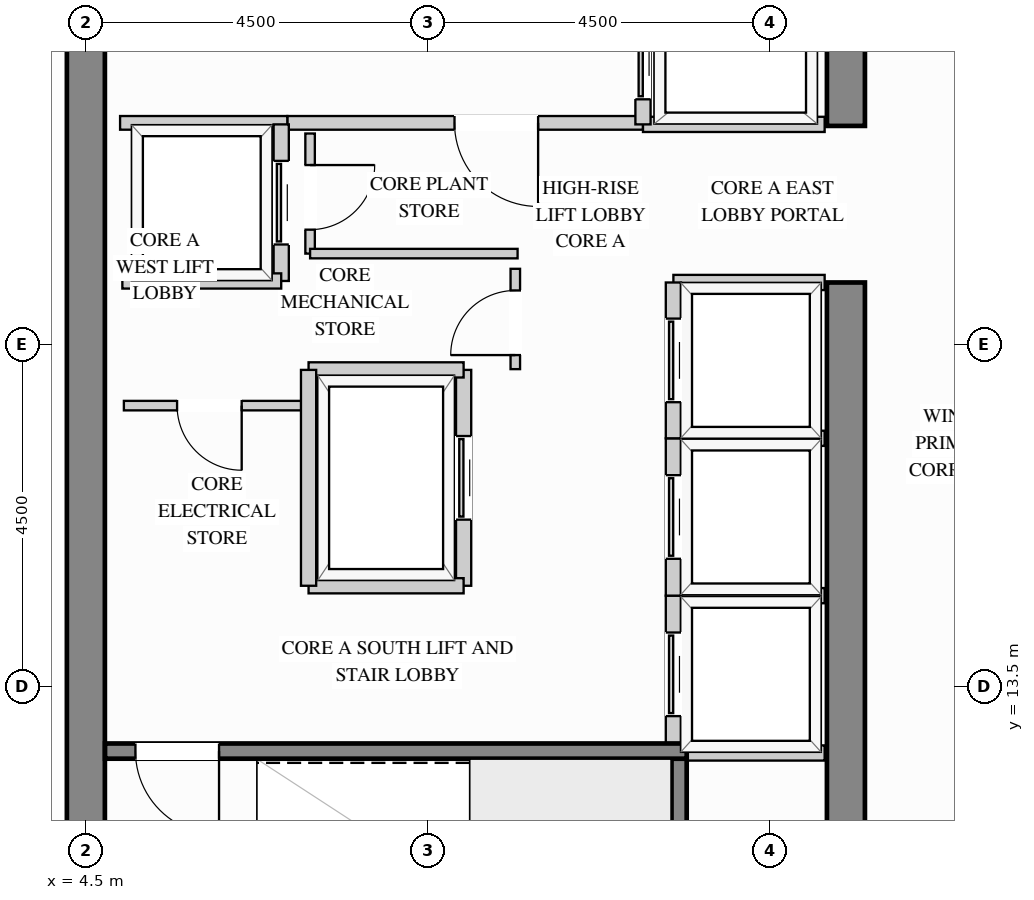
"""IFC4 building model, lengths in metres.
Left out: names, types, materials, properties, quantities, classifications, styles, units other than length and angle.
Written with IfcOpenShell. Run it as: python <this file> out.ifc"""

import sys

from ifc_helpers import new_model, si_unit, direction, frame, frame_2d, origin, place, context, subcontext, project, spatial, rectangle, extrude, source, transform, mapped, element, fill, save


model = new_model("IFC4")
c1 = context("Model", 3, precision=1e-05, world=origin(), true_north=direction((0.0, 1.0)))
c2 = subcontext(c1, "Body", "Model", "MODEL_VIEW")
j1 = project(units=[si_unit("LENGTHUNIT", "METRE"), si_unit("PLANEANGLEUNIT", "RADIAN")], contexts=[c1])
p1 = place(None, origin())
s1 = spatial("IfcSite", under=j1, at=p1, CompositionType="ELEMENT")
p2 = place(p1, origin())
s2 = spatial("IfcBuilding", under=s1, at=p2, CompositionType="ELEMENT")
p3 = place(p2, frame((0.0, 0.0, 230.4)))
s3 = spatial("IfcBuildingStorey", under=s2, at=p3, CompositionType="ELEMENT", Elevation=230.4)
m1 = source(origin(), c2, "Body", "SweptSolid", [
    extrude(rectangle(XDim=10.07, YDim=0.5, at=frame_2d((5.035, 0.0))), origin(), (0.0, 0.0, 1.0), 3.4),
])
p4 = place(p3, frame((14.5, 8.75, 0.0), z_axis=(0.0, 0.0, 1.0), x_axis=(0.0, 1.0, 0.0)))
e1 = element("IfcWall", 1, at=p4, inside=s3, PredefinedType="SHEAR", context=c2, shape_type="MappedRepresentation", body=[
    mapped(m1, transform((0.0, 0.0, 0.0), x_axis=(1.0, 0.0, 0.0), y_axis=(0.0, 1.0, 0.0), z_axis=(0.0, 0.0, 1.0))),
])
m2 = source(origin(), c2, "Body", "SweptSolid", [
    extrude(rectangle(XDim=8.37, YDim=0.5, at=frame_2d((4.185, 0.0))), origin(), (0.0, 0.0, 1.0), 3.4),
])
p5 = place(p3, frame((14.5, 20.88, 0.0), z_axis=(0.0, 0.0, 1.0), x_axis=(0.0, 1.0, 0.0)))
e2 = element("IfcWall", 2, at=p5, inside=s3, PredefinedType="SHEAR", context=c2, shape_type="MappedRepresentation", body=[
    mapped(m2, transform((0.0, 0.0, 0.0), x_axis=(1.0, 0.0, 0.0), y_axis=(0.0, 1.0, 0.0), z_axis=(0.0, 0.0, 1.0))),
])
m3 = source(origin(), c2, "Body", "SweptSolid", [
    extrude(rectangle(XDim=20.5, YDim=0.5, at=frame_2d((10.25, 0.0))), origin(), (0.0, 0.0, 1.0), 3.4),
])
p6 = place(p3, frame((4.5, 8.75, 0.0), z_axis=(0.0, 0.0, 1.0), x_axis=(0.0, 1.0, 0.0)))
e3 = element("IfcWall", 3, at=p6, inside=s3, PredefinedType="SHEAR", context=c2, shape_type="MappedRepresentation", body=[
    mapped(m3, transform((0.0, 0.0, 0.0), x_axis=(1.0, 0.0, 0.0), y_axis=(0.0, 1.0, 0.0), z_axis=(0.0, 0.0, 1.0))),
])
p7 = place(p3, frame((7.15, 20.92, 0.0), z_axis=(0.0, 0.0, 1.0), x_axis=(1.0, 0.0, 0.0)))
e4 = element("IfcWall", 4, at=p7, inside=s3, PredefinedType="PARTITIONING", context=c2, shape_type="SweptSolid", body=[
    extrude(rectangle(XDim=4.68, YDim=0.18, at=frame_2d((2.34, 0.0))), origin(), (0.0, 0.0, 1.0), 3.385),
])
p8 = place(p7, frame((2.2, 0.0, 0.0)))
e5 = element("IfcOpeningElement", 5, at=p8, cuts=e4, PredefinedType="OPENING", context=c2, shape_type="SweptSolid", body=[
    extrude(rectangle(XDim=1.1, YDim=2.15, at=frame_2d((0.55, 1.075))), frame((0.0, 0.1, 0.0), z_axis=(0.0, -1.0, 0.0), x_axis=(1.0, 0.0, 0.0)), (0.0, 0.0, 1.0), 0.2),
])
m4 = source(origin(), c2, "Body", "SweptSolid", [
    extrude(rectangle(XDim=2.2, YDim=0.18, at=frame_2d((1.1, 0.0))), origin(), (0.0, 0.0, 1.0), 3.385),
])
p9 = place(p3, frame((4.95, 20.92, 0.0), z_axis=(0.0, 0.0, 1.0), x_axis=(1.0, 0.0, 0.0)))
e6 = element("IfcWall", 6, at=p9, inside=s3, PredefinedType="PARTITIONING", context=c2, shape_type="MappedRepresentation", body=[
    mapped(m4, transform((0.0, 0.0, 0.0), x_axis=(1.0, 0.0, 0.0), y_axis=(0.0, 1.0, 0.0), z_axis=(0.0, 0.0, 1.0))),
])
p10 = place(p3, frame((10.15, 17.68, 0.0), z_axis=(0.0, 0.0, 1.0), x_axis=(0.0, 1.0, 0.0)))
e7 = element("IfcWall", 7, at=p10, inside=s3, PredefinedType="PARTITIONING", context=c2, shape_type="SweptSolid", body=[
    extrude(rectangle(XDim=1.32, YDim=0.125, at=frame_2d((0.66, 0.0))), origin(), (0.0, 0.0, 1.0), 3.385),
])
p11 = place(p10, frame((0.185, 0.0, 0.0)))
e8 = element("IfcOpeningElement", 8, at=p11, cuts=e7, PredefinedType="OPENING", context=c2, shape_type="SweptSolid", body=[
    extrude(rectangle(XDim=0.85, YDim=2.1, at=frame_2d((0.425, 1.05))), frame((0.0, 0.073, 0.0), z_axis=(0.0, -1.0, 0.0), x_axis=(1.0, 0.0, 0.0)), (0.0, 0.0, 1.0), 0.145),
])
p12 = place(p3, frame((7.45, 19.2, 0.0), z_axis=(0.0, 0.0, 1.0), x_axis=(0.0, 1.0, 0.0)))
e9 = element("IfcWall", 9, at=p12, inside=s3, PredefinedType="PARTITIONING", context=c2, shape_type="SweptSolid", body=[
    extrude(rectangle(XDim=1.58, YDim=0.125, at=frame_2d((0.79, 0.0))), origin(), (0.0, 0.0, 1.0), 3.385),
])
p13 = place(p12, frame((0.315, 0.0, 0.0)))
e10 = element("IfcOpeningElement", 10, at=p13, cuts=e9, PredefinedType="OPENING", context=c2, shape_type="SweptSolid", body=[
    extrude(rectangle(XDim=0.85, YDim=2.1, at=frame_2d((0.425, 1.05))), frame((0.0, 0.073, 0.0), z_axis=(0.0, -1.0, 0.0), x_axis=(1.0, 0.0, 0.0)), (0.0, 0.0, 1.0), 0.145),
])
m5 = source(origin(), c2, "Body", "SweptSolid", [
    extrude(rectangle(XDim=2.73, YDim=0.125, at=frame_2d((1.365, 0.0))), origin(), (0.0, 0.0, 1.0), 3.385),
])
p14 = place(p3, frame((7.45, 19.2, 0.0), z_axis=(0.0, 0.0, 1.0), x_axis=(1.0, 0.0, 0.0)))
e11 = element("IfcWall", 11, at=p14, inside=s3, PredefinedType="PARTITIONING", context=c2, shape_type="MappedRepresentation", body=[
    mapped(m5, transform((0.0, 0.0, 0.0), x_axis=(1.0, 0.0, 0.0), y_axis=(0.0, 1.0, 0.0), z_axis=(0.0, 0.0, 1.0))),
])
p15 = place(p3, frame((5.0, 17.2, 0.0), z_axis=(0.0, 0.0, 1.0), x_axis=(1.0, 0.0, 0.0)))
e12 = element("IfcWall", 12, at=p15, inside=s3, PredefinedType="PARTITIONING", context=c2, shape_type="SweptSolid", body=[
    extrude(rectangle(XDim=2.4, YDim=0.125, at=frame_2d((1.2, 0.0))), origin(), (0.0, 0.0, 1.0), 3.385),
])
p16 = place(p15, frame((0.7, 0.0, 0.0)))
e13 = element("IfcOpeningElement", 13, at=p16, cuts=e12, PredefinedType="OPENING", context=c2, shape_type="SweptSolid", body=[
    extrude(rectangle(XDim=0.85, YDim=2.1, at=frame_2d((0.425, 1.05))), frame((0.0, 0.073, 0.0), z_axis=(0.0, -1.0, 0.0), x_axis=(1.0, 0.0, 0.0)), (0.0, 0.0, 1.0), 0.145),
])
m6 = source(origin(), c2, "Body", "SweptSolid", [
    extrude(rectangle(XDim=2.39, YDim=0.2, at=frame_2d((1.195, 0.0))), origin(), (0.0, 0.0, 1.0), 3.385),
])
p17 = place(p3, frame((11.83, 20.9, 0.0), z_axis=(0.0, 0.0, 1.0), x_axis=(1.0, 0.0, 0.0)))
e14 = element("IfcWall", 14, at=p17, inside=s3, PredefinedType="PARTITIONING", context=c2, shape_type="MappedRepresentation", body=[
    mapped(m6, transform((0.0, 0.0, 0.0), x_axis=(1.0, 0.0, 0.0), y_axis=(0.0, 1.0, 0.0), z_axis=(0.0, 0.0, 1.0))),
])
p18 = place(p3, frame((11.83, 20.9, 0.0), z_axis=(0.0, 0.0, 1.0), x_axis=(0.0, 1.0, 0.0)))
e15 = element("IfcWall", 15, at=p18, inside=s3, PredefinedType="PARTITIONING", context=c2, shape_type="SweptSolid", body=[
    extrude(rectangle(XDim=1.76, YDim=0.2, at=frame_2d((0.88, 0.0))), origin(), (0.0, 0.0, 1.0), 3.385),
])
p19 = place(p18, frame((0.33, 0.0, 0.0)))
e16 = element("IfcOpeningElement", 16, at=p19, cuts=e15, PredefinedType="OPENING", context=c2, shape_type="SweptSolid", body=[
    extrude(rectangle(XDim=1.1, YDim=2.2, at=frame_2d((0.55, 1.1))), frame((0.0, 0.11, 0.0), z_axis=(0.0, -1.0, 0.0), x_axis=(1.0, 0.0, 0.0)), (0.0, 0.0, 1.0), 0.22),
])
m7 = source(origin(), c2, "Body", "SweptSolid", [
    extrude(rectangle(XDim=1.99, YDim=0.2, at=frame_2d((0.995, 0.0))), origin(), (0.0, 0.0, 1.0), 3.385),
])
for number, where, z_axis, x_axis in (
    (17, (12.23, 14.7, 0.0), (0.0, 0.0, 1.0), (1.0, 0.0, 0.0)),
    (18, (12.23, 12.63, 0.0), (0.0, 0.0, 1.0), (1.0, 0.0, 0.0)),
):
    element("IfcWall", number, at=place(p3, frame(where, z_axis=z_axis, x_axis=x_axis)), inside=s3, PredefinedType="PARTITIONING", context=c2, shape_type="MappedRepresentation", body=[
        mapped(m7, transform((0.0, 0.0, 0.0), x_axis=(1.0, 0.0, 0.0), y_axis=(0.0, 1.0, 0.0), z_axis=(0.0, 0.0, 1.0))),
    ])
p20 = place(p3, frame((12.23, 12.63, 0.0), z_axis=(0.0, 0.0, 1.0), x_axis=(0.0, 1.0, 0.0)))
e19 = element("IfcWall", 19, at=p20, inside=s3, PredefinedType="PARTITIONING", context=c2, shape_type="SweptSolid", body=[
    extrude(rectangle(XDim=2.07, YDim=0.2, at=frame_2d((1.035, 0.0))), origin(), (0.0, 0.0, 1.0), 3.385),
])
p21 = place(p20, frame((0.485, 0.0, 0.0)))
e20 = element("IfcOpeningElement", 20, at=p21, cuts=e19, PredefinedType="OPENING", context=c2, shape_type="SweptSolid", body=[
    extrude(rectangle(XDim=1.1, YDim=2.2, at=frame_2d((0.55, 1.1))), frame((0.0, 0.11, 0.0), z_axis=(0.0, -1.0, 0.0), x_axis=(1.0, 0.0, 0.0)), (0.0, 0.0, 1.0), 0.22),
])
p22 = place(p3, frame((12.23, 16.77, 0.0), z_axis=(0.0, 0.0, 1.0), x_axis=(1.0, 0.0, 0.0)))
e21 = element("IfcWall", 21, at=p22, inside=s3, PredefinedType="PARTITIONING", context=c2, shape_type="MappedRepresentation", body=[
    mapped(m7, transform((0.0, 0.0, 0.0), x_axis=(1.0, 0.0, 0.0), y_axis=(0.0, 1.0, 0.0), z_axis=(0.0, 0.0, 1.0))),
])
p23 = place(p3, frame((12.23, 14.7, 0.0), z_axis=(0.0, 0.0, 1.0), x_axis=(0.0, 1.0, 0.0)))
e22 = element("IfcWall", 22, at=p23, inside=s3, PredefinedType="PARTITIONING", context=c2, shape_type="SweptSolid", body=[
    extrude(rectangle(XDim=2.07, YDim=0.2, at=frame_2d((1.035, 0.0))), origin(), (0.0, 0.0, 1.0), 3.385),
])
p24 = place(p23, frame((0.485, 0.0, 0.0)))
e23 = element("IfcOpeningElement", 23, at=p24, cuts=e22, PredefinedType="OPENING", context=c2, shape_type="SweptSolid", body=[
    extrude(rectangle(XDim=1.1, YDim=2.2, at=frame_2d((0.55, 1.1))), frame((0.0, 0.11, 0.0), z_axis=(0.0, -1.0, 0.0), x_axis=(1.0, 0.0, 0.0)), (0.0, 0.0, 1.0), 0.22),
])
p25 = place(p3, frame((12.23, 18.82, 0.0), z_axis=(0.0, 0.0, 1.0), x_axis=(1.0, 0.0, 0.0)))
e24 = element("IfcWall", 24, at=p25, inside=s3, PredefinedType="PARTITIONING", context=c2, shape_type="MappedRepresentation", body=[
    mapped(m7, transform((0.0, 0.0, 0.0), x_axis=(1.0, 0.0, 0.0), y_axis=(0.0, 1.0, 0.0), z_axis=(0.0, 0.0, 1.0))),
])
p26 = place(p3, frame((12.23, 16.77, 0.0), z_axis=(0.0, 0.0, 1.0), x_axis=(0.0, 1.0, 0.0)))
e25 = element("IfcWall", 25, at=p26, inside=s3, PredefinedType="PARTITIONING", context=c2, shape_type="SweptSolid", body=[
    extrude(rectangle(XDim=2.05, YDim=0.2, at=frame_2d((1.025, 0.0))), origin(), (0.0, 0.0, 1.0), 3.385),
])
p27 = place(p26, frame((0.475, 0.0, 0.0)))
e26 = element("IfcOpeningElement", 26, at=p27, cuts=e25, PredefinedType="OPENING", context=c2, shape_type="SweptSolid", body=[
    extrude(rectangle(XDim=1.1, YDim=2.2, at=frame_2d((0.55, 1.1))), frame((0.0, 0.11, 0.0), z_axis=(0.0, -1.0, 0.0), x_axis=(1.0, 0.0, 0.0)), (0.0, 0.0, 1.0), 0.22),
])
p28 = place(p3, frame((7.07, 18.84, 0.0), z_axis=(0.0, 0.0, 1.0), x_axis=(0.0, 1.0, 0.0)))
e27 = element("IfcWall", 27, at=p28, inside=s3, PredefinedType="PARTITIONING", context=c2, shape_type="SweptSolid", body=[
    extrude(rectangle(XDim=2.06, YDim=0.2, at=frame_2d((1.03, 0.0))), origin(), (0.0, 0.0, 1.0), 3.385),
])
p29 = place(p28, frame((0.48, 0.0, 0.0)))
e28 = element("IfcOpeningElement", 28, at=p29, cuts=e27, PredefinedType="OPENING", context=c2, shape_type="SweptSolid", body=[
    extrude(rectangle(XDim=1.1, YDim=2.2, at=frame_2d((0.55, 1.1))), frame((0.0, 0.11, 0.0), z_axis=(0.0, -1.0, 0.0), x_axis=(1.0, 0.0, 0.0)), (0.0, 0.0, 1.0), 0.22),
])
m8 = source(origin(), c2, "Body", "SweptSolid", [
    extrude(rectangle(XDim=2.09, YDim=0.2, at=frame_2d((1.045, 0.0))), origin(), (0.0, 0.0, 1.0), 3.385),
])
p30 = place(p3, frame((4.98, 18.84, 0.0), z_axis=(0.0, 0.0, 1.0), x_axis=(1.0, 0.0, 0.0)))
e29 = element("IfcWall", 29, at=p30, inside=s3, PredefinedType="PARTITIONING", context=c2, shape_type="MappedRepresentation", body=[
    mapped(m8, transform((0.0, 0.0, 0.0), x_axis=(1.0, 0.0, 0.0), y_axis=(0.0, 1.0, 0.0), z_axis=(0.0, 0.0, 1.0))),
])
p31 = place(p3, frame((9.47, 14.83, 0.0), z_axis=(0.0, 0.0, 1.0), x_axis=(0.0, 1.0, 0.0)))
e30 = element("IfcWall", 30, at=p31, inside=s3, PredefinedType="PARTITIONING", context=c2, shape_type="SweptSolid", body=[
    extrude(rectangle(XDim=2.84, YDim=0.2, at=frame_2d((1.42, 0.0))), origin(), (0.0, 0.0, 1.0), 3.385),
])
p32 = place(p31, frame((0.87, 0.0, 0.0)))
e31 = element("IfcOpeningElement", 31, at=p32, cuts=e30, PredefinedType="OPENING", context=c2, shape_type="SweptSolid", body=[
    extrude(rectangle(XDim=1.1, YDim=2.2, at=frame_2d((0.55, 1.1))), frame((0.0, 0.11, 0.0), z_axis=(0.0, -1.0, 0.0), x_axis=(1.0, 0.0, 0.0)), (0.0, 0.0, 1.0), 0.22),
])
m9 = source(origin(), c2, "Body", "SweptSolid", [
    extrude(rectangle(XDim=2.04, YDim=0.2, at=frame_2d((1.02, 0.0))), origin(), (0.0, 0.0, 1.0), 3.385),
])
for number, where, z_axis, x_axis in (
    (32, (7.43, 17.67, 0.0), (0.0, 0.0, 1.0), (1.0, 0.0, 0.0)),
    (33, (7.43, 14.83, 0.0), (0.0, 0.0, 1.0), (1.0, 0.0, 0.0)),
):
    element("IfcWall", number, at=place(p3, frame(where, z_axis=z_axis, x_axis=x_axis)), inside=s3, PredefinedType="PARTITIONING", context=c2, shape_type="MappedRepresentation", body=[
        mapped(m9, transform((0.0, 0.0, 0.0), x_axis=(1.0, 0.0, 0.0), y_axis=(0.0, 1.0, 0.0), z_axis=(0.0, 0.0, 1.0))),
    ])
m10 = source(origin(), c2, "Body", "SweptSolid", [
    extrude(rectangle(XDim=2.84, YDim=0.2, at=frame_2d((1.42, 0.0))), origin(), (0.0, 0.0, 1.0), 3.385),
])
p33 = place(p3, frame((7.43, 14.83, 0.0), z_axis=(0.0, 0.0, 1.0), x_axis=(0.0, 1.0, 0.0)))
e34 = element("IfcWall", 34, at=p33, inside=s3, PredefinedType="PARTITIONING", context=c2, shape_type="MappedRepresentation", body=[
    mapped(m10, transform((0.0, 0.0, 0.0), x_axis=(1.0, 0.0, 0.0), y_axis=(0.0, 1.0, 0.0), z_axis=(0.0, 0.0, 1.0))),
])
m11 = source(origin(), c2, "Body", "SweptSolid", [
    extrude(rectangle(XDim=3.803, YDim=0.2, at=frame_2d((1.901, 0.0))), origin(), (0.0, 0.0, 1.0), 3.4),
])
p34 = place(p3, frame((12.305, 8.752, 0.0), z_axis=(0.0, 0.0, 1.0), x_axis=(0.0, 1.0, 0.0)))
e35 = element("IfcWall", 35, at=p34, inside=s3, PredefinedType="SHEAR", context=c2, shape_type="MappedRepresentation", body=[
    mapped(m11, transform((0.0, 0.0, 0.0), x_axis=(1.0, 0.0, 0.0), y_axis=(0.0, 1.0, 0.0), z_axis=(0.0, 0.0, 1.0))),
])
p35 = place(p3, frame((4.752, 12.655, 0.0), z_axis=(0.0, 0.0, 1.0), x_axis=(1.0, 0.0, 0.0)))
e36 = element("IfcWall", 36, at=p35, inside=s3, PredefinedType="SHEAR", context=c2, shape_type="SweptSolid", body=[
    extrude(rectangle(XDim=7.653, YDim=0.2, at=frame_2d((3.827, 0.0))), origin(), (0.0, 0.0, 1.0), 3.4),
])
p36 = place(p35, frame((0.4, 0.0, 0.0)))
e37 = element("IfcOpeningElement", 37, at=p36, cuts=e36, PredefinedType="OPENING", context=c2, shape_type="SweptSolid", body=[
    extrude(rectangle(XDim=1.1, YDim=2.15, at=frame_2d((0.55, 1.075))), frame((0.0, 0.11, 0.0), z_axis=(0.0, -1.0, 0.0), x_axis=(1.0, 0.0, 0.0)), (0.0, 0.0, 1.0), 0.22),
])
m12 = source(origin(), c2, "Body", "SweptSolid", [
    extrude(rectangle(XDim=1.1, YDim=2.15, at=frame_2d((0.55, 1.075))), frame((0.0, 0.025, 0.0), z_axis=(0.0, -1.0, 0.0), x_axis=(1.0, 0.0, 0.0)), (0.0, 0.0, 1.0), 0.05),
])
p37 = place(p8, origin())
e38 = element("IfcDoor", 38, at=p37, inside=s3, OperationType="SINGLE_SWING_RIGHT", PredefinedType="DOOR", context=c2, shape_type="MappedRepresentation", body=[
    mapped(m12, transform((0.0, 0.0, 0.0), x_axis=(1.0, 0.0, 0.0), y_axis=(0.0, 1.0, 0.0), z_axis=(0.0, 0.0, 1.0))),
])
fill(e5, e38)
m13 = source(origin(), c2, "Body", "SweptSolid", [
    extrude(rectangle(XDim=1.1, YDim=2.2, at=frame_2d((0.55, 1.1))), frame((0.0, 0.025, 0.0), z_axis=(0.0, -1.0, 0.0), x_axis=(1.0, 0.0, 0.0)), (0.0, 0.0, 1.0), 0.05),
])
p38 = place(p19, origin())
e39 = element("IfcDoor", 39, at=p38, inside=s3, OperationType="SLIDING_TO_LEFT", PredefinedType="DOOR", context=c2, shape_type="MappedRepresentation", body=[
    mapped(m13, transform((0.0, 0.0, 0.0), x_axis=(1.0, 0.0, 0.0), y_axis=(0.0, 1.0, 0.0), z_axis=(0.0, 0.0, 1.0))),
])
fill(e16, e39)
p39 = place(p21, origin())
e40 = element("IfcDoor", 40, at=p39, inside=s3, OperationType="SLIDING_TO_LEFT", PredefinedType="DOOR", context=c2, shape_type="MappedRepresentation", body=[
    mapped(m13, transform((0.0, 0.0, 0.0), x_axis=(1.0, 0.0, 0.0), y_axis=(0.0, 1.0, 0.0), z_axis=(0.0, 0.0, 1.0))),
])
fill(e20, e40)
p40 = place(p24, origin())
e41 = element("IfcDoor", 41, at=p40, inside=s3, OperationType="SLIDING_TO_LEFT", PredefinedType="DOOR", context=c2, shape_type="MappedRepresentation", body=[
    mapped(m13, transform((0.0, 0.0, 0.0), x_axis=(1.0, 0.0, 0.0), y_axis=(0.0, 1.0, 0.0), z_axis=(0.0, 0.0, 1.0))),
])
fill(e23, e41)
p41 = place(p27, origin())
e42 = element("IfcDoor", 42, at=p41, inside=s3, OperationType="SLIDING_TO_LEFT", PredefinedType="DOOR", context=c2, shape_type="MappedRepresentation", body=[
    mapped(m13, transform((0.0, 0.0, 0.0), x_axis=(1.0, 0.0, 0.0), y_axis=(0.0, 1.0, 0.0), z_axis=(0.0, 0.0, 1.0))),
])
fill(e26, e42)
p42 = place(p29, origin())
e43 = element("IfcDoor", 43, at=p42, inside=s3, OperationType="SLIDING_TO_LEFT", PredefinedType="DOOR", context=c2, shape_type="MappedRepresentation", body=[
    mapped(m13, transform((0.0, 0.0, 0.0), x_axis=(1.0, 0.0, 0.0), y_axis=(0.0, 1.0, 0.0), z_axis=(0.0, 0.0, 1.0))),
])
fill(e28, e43)
p43 = place(p32, origin())
e44 = element("IfcDoor", 44, at=p43, inside=s3, OperationType="SLIDING_TO_LEFT", PredefinedType="DOOR", context=c2, shape_type="MappedRepresentation", body=[
    mapped(m13, transform((0.0, 0.0, 0.0), x_axis=(1.0, 0.0, 0.0), y_axis=(0.0, 1.0, 0.0), z_axis=(0.0, 0.0, 1.0))),
])
fill(e31, e44)
m14 = source(origin(), c2, "Body", "SweptSolid", [
    extrude(rectangle(XDim=0.85, YDim=2.1, at=frame_2d((0.425, 1.05))), frame((0.0, 0.025, 0.0), z_axis=(0.0, -1.0, 0.0), x_axis=(1.0, 0.0, 0.0)), (0.0, 0.0, 1.0), 0.05),
])
p44 = place(p11, origin())
e45 = element("IfcDoor", 45, at=p44, inside=s3, OperationType="SINGLE_SWING_LEFT", PredefinedType="DOOR", context=c2, shape_type="MappedRepresentation", body=[
    mapped(m14, transform((0.0, 0.0, 0.0), x_axis=(1.0, 0.0, 0.0), y_axis=(0.0, 1.0, 0.0), z_axis=(0.0, 0.0, 1.0))),
])
fill(e8, e45)
p45 = place(p16, origin())
e46 = element("IfcDoor", 46, at=p45, inside=s3, OperationType="SINGLE_SWING_RIGHT", PredefinedType="DOOR", context=c2, shape_type="MappedRepresentation", body=[
    mapped(m14, transform((0.0, 0.0, 0.0), x_axis=(1.0, 0.0, 0.0), y_axis=(0.0, 1.0, 0.0), z_axis=(0.0, 0.0, 1.0))),
])
fill(e13, e46)
p46 = place(p13, origin())
e47 = element("IfcDoor", 47, at=p46, inside=s3, OperationType="SINGLE_SWING_RIGHT", PredefinedType="DOOR", context=c2, shape_type="MappedRepresentation", body=[
    mapped(m14, transform((0.0, 0.0, 0.0), x_axis=(1.0, 0.0, 0.0), y_axis=(0.0, 1.0, 0.0), z_axis=(0.0, 0.0, 1.0))),
])
fill(e10, e47)
m15 = source(origin(), c2, "Body", "SweptSolid", [
    extrude(rectangle(XDim=1.1, YDim=2.15, at=frame_2d((0.55, 1.075))), frame((0.0, 0.025, 0.0), z_axis=(0.0, -1.0, 0.0), x_axis=(1.0, 0.0, 0.0)), (0.0, 0.0, 1.0), 0.05),
])
p47 = place(p36, origin())
e48 = element("IfcDoor", 48, at=p47, inside=s3, OperationType="SINGLE_SWING_RIGHT", PredefinedType="DOOR", context=c2, shape_type="MappedRepresentation", body=[
    mapped(m15, transform((0.0, 0.0, 0.0), x_axis=(1.0, 0.0, 0.0), y_axis=(0.0, 1.0, 0.0), z_axis=(0.0, 0.0, 1.0))),
])
fill(e37, e48)
save(model, sys.argv[1])
